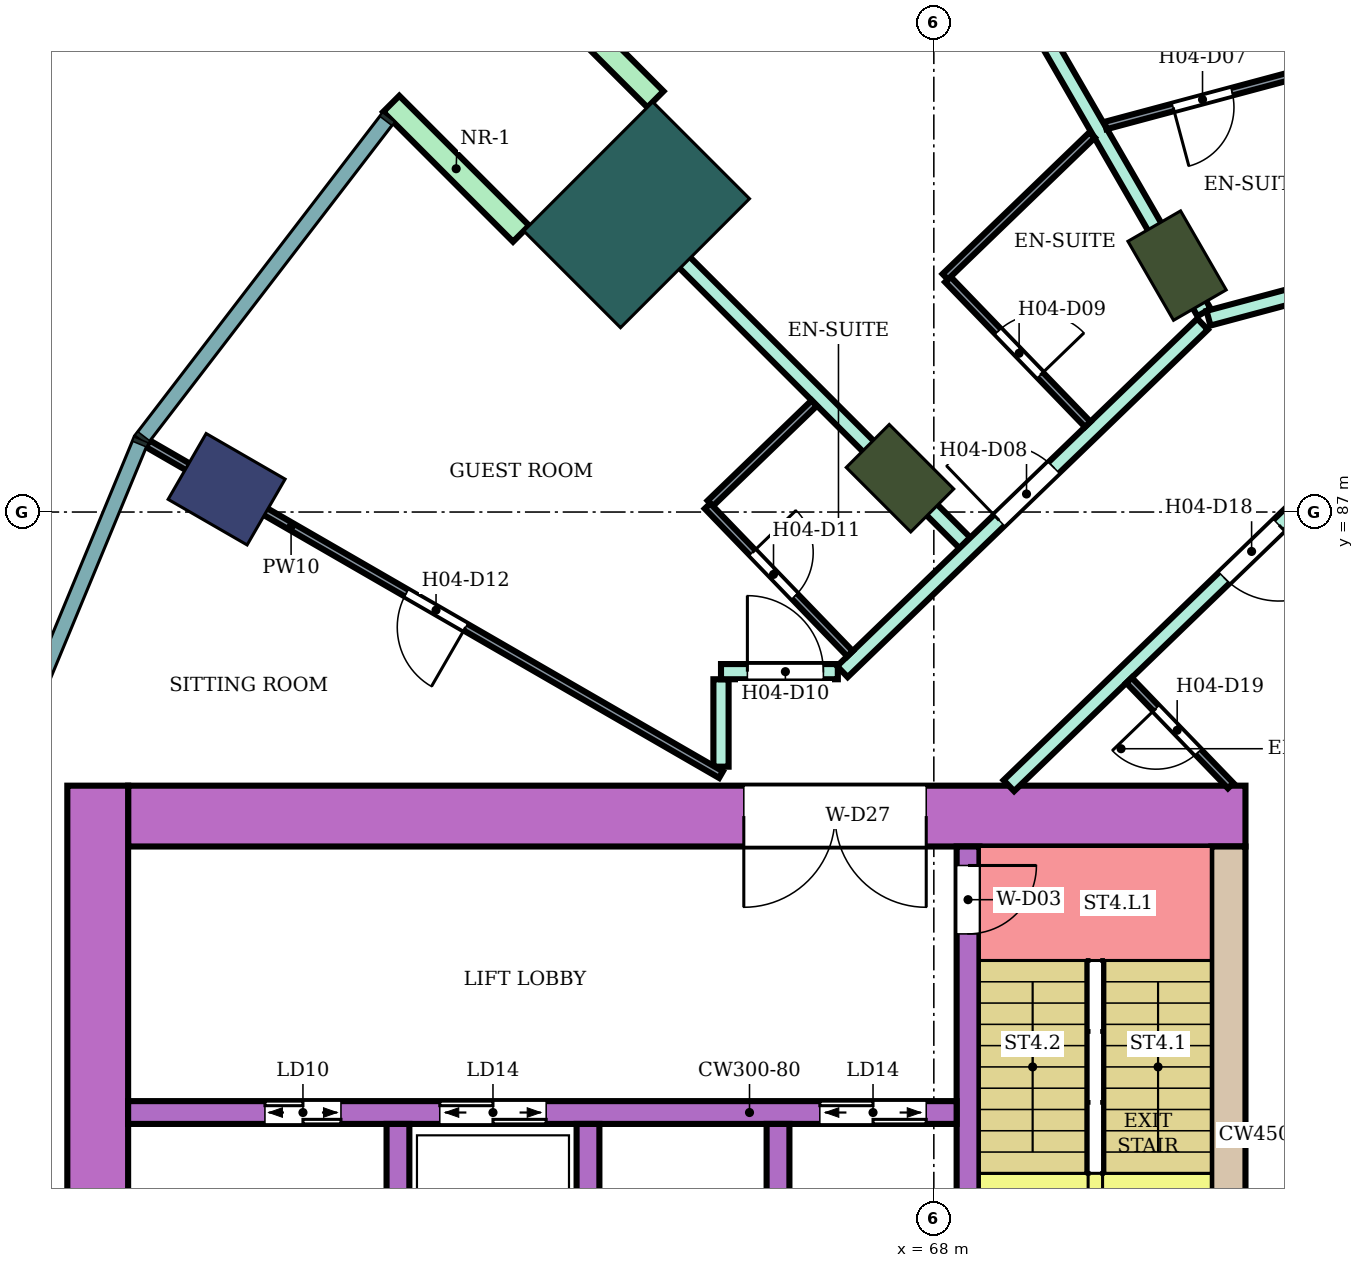
"""IFC4 building model, lengths in metres.
Left out: names, types, materials, properties, quantities, classifications, styles, units other than length and angle.
Written with IfcOpenShell. Run it as: python <this file> out.ifc"""

import sys

from ifc_helpers import new_model, si_unit, direction, frame, frame_2d, origin, origin_2d, place, context, subcontext, project, spatial, rectangle, extrude, element, fill, save


model = new_model("IFC4")
c1 = context("Model", 3, precision=1e-05, world=origin(), true_north=direction((0.0, 1.0)))
c2 = subcontext(c1, "Body", "Model", "MODEL_VIEW")
j1 = project(units=[si_unit("LENGTHUNIT", "METRE"), si_unit("PLANEANGLEUNIT", "RADIAN")], contexts=[c1])
p1 = place(None, origin())
s1 = spatial("IfcSite", under=j1, at=p1, CompositionType="ELEMENT")
p2 = place(p1, origin())
s2 = spatial("IfcBuilding", under=s1, at=p2, CompositionType="ELEMENT")
p3 = place(p2, frame((0.0, 0.0, 66.8)))
s3 = spatial("IfcBuildingStorey", under=s2, at=p3, CompositionType="ELEMENT", Elevation=66.8)
p4 = place(p3, frame((58.696, 87.3, 0.0), z_axis=(0.0, 0.0, 1.0), x_axis=(-0.866025403784, 0.5, 0.0)))
e1 = element("IfcColumn", 1, at=p4, inside=s3, PredefinedType="COLUMN", context=c2, shape_type="SweptSolid", body=[
    extrude(rectangle(XDim=1.2, YDim=1.0, at=origin_2d()), origin(), (0.0, 0.0, 1.0), 3.8),
])
for number, where, z_axis, x_axis in (
    (2, (71.2, 90.242, 0.0), (0.0, 0.0, 1.0), (-0.5, 0.866, 0.0)),
    (3, (67.555, 87.445, 0.0), (0.0, 0.0, 1.0), (-0.707, 0.707, 0.0)),
):
    element("IfcColumn", number, at=place(p3, frame(where, z_axis=z_axis, x_axis=x_axis)), inside=s3, PredefinedType="COLUMN", context=c2, shape_type="SweptSolid", body=[
        extrude(rectangle(XDim=1.2, YDim=0.8, at=origin_2d()), origin(), (0.0, 0.0, 1.0), 3.8),
    ])
p5 = place(p3, frame((64.09, 90.91, 0.0), z_axis=(0.0, 0.0, 1.0), x_axis=(-0.707106781187, 0.707106781187, 0.0)))
e4 = element("IfcColumn", 4, at=p5, inside=s3, PredefinedType="COLUMN", context=c2, shape_type="SweptSolid", body=[
    extrude(rectangle(XDim=1.8, YDim=2.4, at=origin_2d()), origin(), (0.0, 0.0, 1.0), 3.8),
])
p6 = place(p3, frame((72.1, 83.0, 0.0), z_axis=(0.0, 0.0, 1.0), x_axis=(-1.0, 0.0, 0.0)))
e5 = element("IfcWall", 5, at=p6, inside=s3, PredefinedType="SHEAR", context=c2, shape_type="SweptSolid", body=[
    extrude(rectangle(XDim=14.7, YDim=0.8, at=frame_2d((7.35, 0.0))), origin(), (0.0, 0.0, 1.0), 3.48),
])
p7 = place(p6, frame((4.2, 0.0, 0.0)))
e6 = element("IfcOpeningElement", 6, at=p7, cuts=e5, PredefinedType="OPENING", context=c2, shape_type="SweptSolid", body=[
    extrude(rectangle(XDim=2.4, YDim=2.4, at=frame_2d((1.2, 1.2))), frame((0.0, 0.41, 0.0), z_axis=(0.0, -1.0, 0.0), x_axis=(1.0, 0.0, 0.0)), (0.0, 0.0, 1.0), 0.82),
])
p8 = place(p3, frame((71.875, 82.6, 0.0), z_axis=(0.0, 0.0, 1.0), x_axis=(0.0, -1.0, 0.0)))
e7 = element("IfcWall", 7, at=p8, inside=s3, PredefinedType="SHEAR", context=c2, shape_type="SweptSolid", body=[
    extrude(rectangle(XDim=7.6, YDim=0.45, at=frame_2d((3.8, 0.0))), origin(), (0.0, 0.0, 1.0), 3.48),
])
p9 = place(p3, frame((57.0, 83.4, 0.0), z_axis=(0.0, 0.0, 1.0), x_axis=(0.0, -1.0, 0.0)))
e8 = element("IfcWall", 8, at=p9, inside=s3, PredefinedType="SHEAR", context=c2, shape_type="SweptSolid", body=[
    extrude(rectangle(XDim=16.8, YDim=0.8, at=frame_2d((8.4, 0.0))), origin(), (0.0, 0.0, 1.0), 3.48),
])
p10 = place(p3, frame((68.45, 82.6, 0.0), z_axis=(0.0, 0.0, 1.0), x_axis=(0.0, -1.0, 0.0)))
e9 = element("IfcWall", 9, at=p10, inside=s3, PredefinedType="SHEAR", context=c2, shape_type="SweptSolid", body=[
    extrude(rectangle(XDim=7.6, YDim=0.3, at=frame_2d((3.8, 0.0))), origin(), (0.0, 0.0, 1.0), 3.48),
])
p11 = place(p10, frame((0.25, 0.0, 0.0)))
e10 = element("IfcOpeningElement", 10, at=p11, cuts=e9, PredefinedType="OPENING", context=c2, shape_type="SweptSolid", body=[
    extrude(rectangle(XDim=0.9, YDim=2.1, at=frame_2d((0.45, 1.05))), frame((0.0, 0.16, 0.0), z_axis=(0.0, -1.0, 0.0), x_axis=(1.0, 0.0, 0.0)), (0.0, 0.0, 1.0), 0.32),
])
p12 = place(p3, frame((68.3, 79.1, 0.0), z_axis=(0.0, 0.0, 1.0), x_axis=(-1.0, 0.0, 0.0)))
e11 = element("IfcWall", 11, at=p12, inside=s3, PredefinedType="SHEAR", context=c2, shape_type="SweptSolid", body=[
    extrude(rectangle(XDim=10.9, YDim=0.3, at=frame_2d((5.45, 0.0))), origin(), (0.0, 0.0, 1.0), 3.48),
])
p13 = place(p12, frame((0.4, 0.0, 0.0)))
e12 = element("IfcOpeningElement", 12, at=p13, cuts=e11, PredefinedType="OPENING", context=c2, shape_type="SweptSolid", body=[
    extrude(rectangle(XDim=1.4, YDim=2.1, at=frame_2d((0.7, 1.05))), frame((0.0, 0.16, 0.0), z_axis=(0.0, -1.0, 0.0), x_axis=(1.0, 0.0, 0.0)), (0.0, 0.0, 1.0), 0.32),
])
p14 = place(p12, frame((5.4, 0.0, 0.0)))
e13 = element("IfcOpeningElement", 13, at=p14, cuts=e11, PredefinedType="OPENING", context=c2, shape_type="SweptSolid", body=[
    extrude(rectangle(XDim=1.4, YDim=2.1, at=frame_2d((0.7, 1.05))), frame((0.0, 0.16, 0.0), z_axis=(0.0, -1.0, 0.0), x_axis=(1.0, 0.0, 0.0)), (0.0, 0.0, 1.0), 0.32),
])
p15 = place(p12, frame((8.1, 0.0, 0.0)))
e14 = element("IfcOpeningElement", 14, at=p15, cuts=e11, PredefinedType="OPENING", context=c2, shape_type="SweptSolid", body=[
    extrude(rectangle(XDim=1.0, YDim=2.1, at=frame_2d((0.5, 1.05))), frame((0.0, 0.16, 0.0), z_axis=(0.0, -1.0, 0.0), x_axis=(1.0, 0.0, 0.0)), (0.0, 0.0, 1.0), 0.32),
])
for number, where, z_axis, x_axis in (
    (15, (65.95, 78.95, 0.0), (0.0, 0.0, 1.0), (0.0, -1.0, 0.0)),
    (16, (63.45, 78.95, 0.0), (0.0, 0.0, 1.0), (0.0, -1.0, 0.0)),
    (17, (60.95, 78.95, 0.0), (0.0, 0.0, 1.0), (0.0, -1.0, 0.0)),
):
    element("IfcWall", number, at=place(p3, frame(where, z_axis=z_axis, x_axis=x_axis)), inside=s3, PredefinedType="SHEAR", context=c2, shape_type="SweptSolid", body=[
        extrude(rectangle(XDim=2.55, YDim=0.3, at=frame_2d((1.275, 0.0))), origin(), (0.0, 0.0, 1.0), 3.48),
    ])
for number, where, z_axis, x_axis in (
    (18, (64.338, 92.43, 0.0), (0.0, 0.0, 1.0), (-0.707, 0.707, 0.0)),
    (19, (62.57, 90.662, 0.0), (0.0, 0.0, 1.0), (-0.707, 0.707, 0.0)),
):
    element("IfcWall", number, at=place(p3, frame(where, z_axis=z_axis, x_axis=x_axis)), inside=s3, PredefinedType="NOTDEFINED", context=c2, shape_type="SweptSolid", body=[
        extrude(rectangle(XDim=2.416, YDim=0.3, at=frame_2d((1.208, 0.0))), origin(), (0.0, 0.0, 1.0), 3.8),
    ])
p16 = place(p3, frame((73.415, 78.802, 0.0), z_axis=(0.0, 0.0, 1.0), x_axis=(-0.258789828301, -0.965933654434, 0.0)))
e20 = element("IfcWall", 20, at=p16, inside=s3, PredefinedType="NOTDEFINED", context=c2, shape_type="SweptSolid", body=[
    extrude(rectangle(XDim=3.936, YDim=0.2, at=frame_2d((1.968, 0.0))), origin(), (0.0, 0.0, 1.0), 3.8),
])
p17 = place(p16, frame((0.468, 0.0, 0.9)))
e21 = element("IfcOpeningElement", 21, at=p17, cuts=e20, PredefinedType="OPENING", context=c2, shape_type="SweptSolid", body=[
    extrude(rectangle(XDim=3.0, YDim=2.3, at=frame_2d((1.5, 1.15))), frame((0.0, 0.11, 0.0), z_axis=(0.0, -1.0, 0.0), x_axis=(1.0, 0.0, 0.0)), (0.0, 0.0, 1.0), 0.22),
])
p18 = place(p3, frame((63.598, 91.407, 0.0), z_axis=(0.0, 0.0, 1.0), x_axis=(0.706981202484, -0.707232337591, 0.0)))
e22 = element("IfcWall", 22, at=p18, inside=s3, PredefinedType="PARTITIONING", context=c2, shape_type="SweptSolid", body=[
    extrude(rectangle(XDim=6.805, YDim=0.2, at=frame_2d((3.402, 0.0))), origin(), (0.0, 0.0, 1.0), 3.35),
])
p19 = place(p3, frame((65.2, 83.65, 0.0), z_axis=(0.0, 0.0, 1.0), x_axis=(0.0, 1.0, 0.0)))
e23 = element("IfcWall", 23, at=p19, inside=s3, PredefinedType="PARTITIONING", context=c2, shape_type="SweptSolid", body=[
    extrude(rectangle(XDim=1.15, YDim=0.2, at=frame_2d((0.575, 0.0))), origin(), (0.0, 0.0, 1.0), 3.35),
])
p20 = place(p3, frame((65.2, 84.9, 0.0), z_axis=(0.0, 0.0, 1.0), x_axis=(1.0, 0.0, 0.0)))
e24 = element("IfcWall", 24, at=p20, inside=s3, PredefinedType="PARTITIONING", context=c2, shape_type="SweptSolid", body=[
    extrude(rectangle(XDim=1.537, YDim=0.2, at=frame_2d((0.769, 0.0))), origin(), (0.0, 0.0, 1.0), 3.35),
])
p21 = place(p20, frame((0.347, 0.0, 0.0)))
e25 = element("IfcOpeningElement", 25, at=p21, cuts=e24, PredefinedType="OPENING", context=c2, shape_type="SweptSolid", body=[
    extrude(rectangle(XDim=1.0, YDim=2.1, at=frame_2d((0.5, 1.05))), frame((0.0, 0.11, 0.0), z_axis=(0.0, -1.0, 0.0), x_axis=(1.0, 0.0, 0.0)), (0.0, 0.0, 1.0), 0.22),
])
p22 = place(p3, frame((66.797, 84.9, 0.0), z_axis=(0.0, 0.0, 1.0), x_axis=(0.719692092412, 0.694293376116, 0.0)))
e26 = element("IfcWall", 26, at=p22, inside=s3, PredefinedType="PARTITIONING", context=c2, shape_type="SweptSolid", body=[
    extrude(rectangle(XDim=6.584, YDim=0.2, at=frame_2d((3.292, 0.0))), origin(), (0.0, 0.0, 1.0), 3.35),
])
p23 = place(p22, frame((2.866, 0.0, 0.0)))
e27 = element("IfcOpeningElement", 27, at=p23, cuts=e26, PredefinedType="OPENING", context=c2, shape_type="SweptSolid", body=[
    extrude(rectangle(XDim=1.0, YDim=2.1, at=frame_2d((0.5, 1.05))), frame((0.0, 0.11, 0.0), z_axis=(0.0, -1.0, 0.0), x_axis=(1.0, 0.0, 0.0)), (0.0, 0.0, 1.0), 0.22),
])
p24 = place(p3, frame((67.101, 97.342, 0.0), z_axis=(0.0, 0.0, 1.0), x_axis=(0.499932813297, -0.866064190571, 0.0)))
e28 = element("IfcWall", 28, at=p24, inside=s3, PredefinedType="PARTITIONING", context=c2, shape_type="SweptSolid", body=[
    extrude(rectangle(XDim=8.908, YDim=0.2, at=frame_2d((4.454, 0.0))), origin(), (0.0, 0.0, 1.0), 3.35),
])
p25 = place(p3, frame((68.987, 83.4, 0.0), z_axis=(0.0, 0.0, 1.0), x_axis=(0.719591503389, 0.694397629784, 0.0)))
e29 = element("IfcWall", 29, at=p25, inside=s3, PredefinedType="PARTITIONING", context=c2, shape_type="SweptSolid", body=[
    extrude(rectangle(XDim=5.378, YDim=0.2, at=frame_2d((2.689, 0.0))), origin(), (0.0, 0.0, 1.0), 3.35),
])
p26 = place(p25, frame((3.938, 0.0, 0.0)))
e30 = element("IfcOpeningElement", 30, at=p26, cuts=e29, PredefinedType="OPENING", context=c2, shape_type="SweptSolid", body=[
    extrude(rectangle(XDim=1.0, YDim=2.1, at=frame_2d((0.5, 1.05))), frame((0.0, 0.11, 0.0), z_axis=(0.0, -1.0, 0.0), x_axis=(1.0, 0.0, 0.0)), (0.0, 0.0, 1.0), 0.22),
])
p27 = place(p3, frame((71.614, 89.55, 0.0), z_axis=(0.0, 0.0, 1.0), x_axis=(0.965982156828, 0.258608725086, 0.0)))
e31 = element("IfcWall", 31, at=p27, inside=s3, PredefinedType="PARTITIONING", context=c2, shape_type="SweptSolid", body=[
    extrude(rectangle(XDim=8.592, YDim=0.2, at=frame_2d((4.296, 0.0))), origin(), (0.0, 0.0, 1.0), 3.35),
])
p28 = place(p27, frame((4.865, 0.0, 0.0)))
e32 = element("IfcOpeningElement", 32, at=p28, cuts=e31, PredefinedType="OPENING", context=c2, shape_type="SweptSolid", body=[
    extrude(rectangle(XDim=1.0, YDim=2.1, at=frame_2d((0.5, 1.05))), frame((0.0, 0.11, 0.0), z_axis=(0.0, -1.0, 0.0), x_axis=(1.0, 0.0, 0.0)), (0.0, 0.0, 1.0), 0.22),
])
p29 = place(p27, frame((2.804, 0.0, 0.0)))
e33 = element("IfcOpeningElement", 33, at=p29, cuts=e31, PredefinedType="OPENING", context=c2, shape_type="SweptSolid", body=[
    extrude(rectangle(XDim=1.0, YDim=2.1, at=frame_2d((0.5, 1.05))), frame((0.0, 0.11, 0.0), z_axis=(0.0, -1.0, 0.0), x_axis=(1.0, 0.0, 0.0)), (0.0, 0.0, 1.0), 0.22),
])
p30 = place(p3, frame((57.659, 87.899, 0.0), z_axis=(0.0, 0.0, 1.0), x_axis=(0.86602264145, -0.500004784474, 0.0)))
e34 = element("IfcWall", 34, at=p30, inside=s3, PredefinedType="PARTITIONING", context=c2, shape_type="SweptSolid", body=[
    extrude(rectangle(XDim=8.708, YDim=0.1, at=frame_2d((4.354, 0.0))), origin(), (0.0, 0.0, 1.0), 3.35),
])
p31 = place(p30, frame((3.929, 0.0, 0.0)))
e35 = element("IfcOpeningElement", 35, at=p31, cuts=e34, PredefinedType="OPENING", context=c2, shape_type="SweptSolid", body=[
    extrude(rectangle(XDim=0.9, YDim=2.1, at=frame_2d((0.45, 1.05))), frame((0.0, 0.06, 0.0), z_axis=(0.0, -1.0, 0.0), x_axis=(1.0, 0.0, 0.0)), (0.0, 0.0, 1.0), 0.12),
])
p32 = place(p3, frame((65.059, 87.114, 0.0), z_axis=(0.0, 0.0, 1.0), x_axis=(0.719715847356, 0.694268751324, 0.0)))
e36 = element("IfcWall", 36, at=p32, inside=s3, PredefinedType="PARTITIONING", context=c2, shape_type="SweptSolid", body=[
    extrude(rectangle(XDim=1.9, YDim=0.1, at=frame_2d((0.95, 0.0))), origin(), (0.0, 0.0, 1.0), 3.35),
])
p33 = place(p3, frame((65.023, 87.079, 0.0), z_axis=(0.0, 0.0, 1.0), x_axis=(0.694287838235, -0.719697434815, 0.0)))
e37 = element("IfcWall", 37, at=p33, inside=s3, PredefinedType="PARTITIONING", context=c2, shape_type="SweptSolid", body=[
    extrude(rectangle(XDim=2.7, YDim=0.1, at=frame_2d((1.35, 0.0))), origin(), (0.0, 0.0, 1.0), 3.35),
])
p34 = place(p33, frame((0.85, 0.0, 0.0)))
e38 = element("IfcOpeningElement", 38, at=p34, cuts=e37, PredefinedType="OPENING", context=c2, shape_type="SweptSolid", body=[
    extrude(rectangle(XDim=0.8, YDim=2.1, at=frame_2d((0.4, 1.05))), frame((0.0, 0.06, 0.0), z_axis=(0.0, -1.0, 0.0), x_axis=(1.0, 0.0, 0.0)), (0.0, 0.0, 1.0), 0.12),
])
p35 = place(p3, frame((68.185, 90.06, 0.0), z_axis=(0.0, 0.0, 1.0), x_axis=(0.69446127412, -0.719530081892, 0.0)))
e39 = element("IfcWall", 39, at=p35, inside=s3, PredefinedType="PARTITIONING", context=c2, shape_type="SweptSolid", body=[
    extrude(rectangle(XDim=2.649, YDim=0.1, at=frame_2d((1.324, 0.0))), origin(), (0.0, 0.0, 1.0), 3.35),
])
p36 = place(p35, frame((0.95, 0.0, 0.0)))
e40 = element("IfcOpeningElement", 40, at=p36, cuts=e39, PredefinedType="OPENING", context=c2, shape_type="SweptSolid", body=[
    extrude(rectangle(XDim=0.8, YDim=2.1, at=frame_2d((0.4, 1.05))), frame((0.0, 0.06, 0.0), z_axis=(0.0, -1.0, 0.0), x_axis=(1.0, 0.0, 0.0)), (0.0, 0.0, 1.0), 0.12),
])
p37 = place(p3, frame((68.15, 90.096, 0.0), z_axis=(0.0, 0.0, 1.0), x_axis=(0.719669144226, 0.694317163009, 0.0)))
e41 = element("IfcWall", 41, at=p37, inside=s3, PredefinedType="PARTITIONING", context=c2, shape_type="SweptSolid", body=[
    extrude(rectangle(XDim=2.687, YDim=0.1, at=frame_2d((1.343, 0.0))), origin(), (0.0, 0.0, 1.0), 3.35),
])
p38 = place(p3, frame((70.258, 92.085, 0.0), z_axis=(0.0, 0.0, 1.0), x_axis=(0.965948051503, 0.258736085224, 0.0)))
e42 = element("IfcWall", 42, at=p38, inside=s3, PredefinedType="PARTITIONING", context=c2, shape_type="SweptSolid", body=[
    extrude(rectangle(XDim=2.703, YDim=0.1, at=frame_2d((1.352, 0.0))), origin(), (0.0, 0.0, 1.0), 3.35),
])
p39 = place(p38, frame((0.922, 0.0, 0.0)))
e43 = element("IfcOpeningElement", 43, at=p39, cuts=e42, PredefinedType="OPENING", context=c2, shape_type="SweptSolid", body=[
    extrude(rectangle(XDim=0.8, YDim=2.1, at=frame_2d((0.4, 1.05))), frame((0.0, 0.06, 0.0), z_axis=(0.0, -1.0, 0.0), x_axis=(1.0, 0.0, 0.0)), (0.0, 0.0, 1.0), 0.12),
])
p40 = place(p3, frame((70.567, 84.786, 0.0), z_axis=(0.0, 0.0, 1.0), x_axis=(0.694447472534, -0.719543402368, 0.0)))
e44 = element("IfcWall", 44, at=p40, inside=s3, PredefinedType="PARTITIONING", context=c2, shape_type="SweptSolid", body=[
    extrude(rectangle(XDim=1.926, YDim=0.1, at=frame_2d((0.963, 0.0))), origin(), (0.0, 0.0, 1.0), 3.35),
])
p41 = place(p40, frame((0.513, 0.0, 0.0)))
e45 = element("IfcOpeningElement", 45, at=p41, cuts=e44, PredefinedType="OPENING", context=c2, shape_type="SweptSolid", body=[
    extrude(rectangle(XDim=0.8, YDim=2.1, at=frame_2d((0.4, 1.05))), frame((0.0, 0.06, 0.0), z_axis=(0.0, -1.0, 0.0), x_axis=(1.0, 0.0, 0.0)), (0.0, 0.0, 1.0), 0.12),
])
p42 = place(p17, origin())
e46 = element("IfcWindow", 46, at=p42, inside=s3, PartitioningType="SINGLE_PANEL", PredefinedType="WINDOW", context=c2, shape_type="SweptSolid", body=[
    extrude(rectangle(XDim=3.0, YDim=2.3, at=frame_2d((1.5, 1.15))), frame((0.0, 0.03, 0.0), z_axis=(0.0, -1.0, 0.0), x_axis=(1.0, 0.0, 0.0)), (0.0, 0.0, 1.0), 0.06),
])
fill(e21, e46)
p43 = place(p39, frame((0.8, 0.0, 0.0), z_axis=(0.0, 0.0, 1.0), x_axis=(-1.0, 0.0, 0.0)))
e47 = element("IfcDoor", 47, at=p43, inside=s3, OperationType="SINGLE_SWING_RIGHT", PredefinedType="DOOR", context=c2, shape_type="SweptSolid", body=[
    extrude(rectangle(XDim=0.8, YDim=2.1, at=frame_2d((0.4, 1.05))), frame((0.0, 0.025, 0.0), z_axis=(0.0, -1.0, 0.0), x_axis=(1.0, 0.0, 0.0)), (0.0, 0.0, 1.0), 0.05),
])
fill(e43, e47)
p44 = place(p23, origin())
e48 = element("IfcDoor", 48, at=p44, inside=s3, OperationType="SINGLE_SWING_LEFT", PredefinedType="DOOR", context=c2, shape_type="SweptSolid", body=[
    extrude(rectangle(XDim=1.0, YDim=2.1, at=frame_2d((0.5, 1.05))), frame((0.0, 0.025, 0.0), z_axis=(0.0, -1.0, 0.0), x_axis=(1.0, 0.0, 0.0)), (0.0, 0.0, 1.0), 0.05),
])
fill(e27, e48)
p45 = place(p36, origin())
e49 = element("IfcDoor", 49, at=p45, inside=s3, OperationType="SINGLE_SWING_RIGHT", PredefinedType="DOOR", context=c2, shape_type="SweptSolid", body=[
    extrude(rectangle(XDim=0.8, YDim=2.1, at=frame_2d((0.4, 1.05))), frame((0.0, 0.025, 0.0), z_axis=(0.0, -1.0, 0.0), x_axis=(1.0, 0.0, 0.0)), (0.0, 0.0, 1.0), 0.05),
])
fill(e40, e49)
p46 = place(p21, origin())
e50 = element("IfcDoor", 50, at=p46, inside=s3, OperationType="SINGLE_SWING_LEFT", PredefinedType="DOOR", context=c2, shape_type="SweptSolid", body=[
    extrude(rectangle(XDim=1.0, YDim=2.1, at=frame_2d((0.5, 1.05))), frame((0.0, 0.025, 0.0), z_axis=(0.0, -1.0, 0.0), x_axis=(1.0, 0.0, 0.0)), (0.0, 0.0, 1.0), 0.05),
])
fill(e25, e50)
p47 = place(p34, origin())
e51 = element("IfcDoor", 51, at=p47, inside=s3, OperationType="SINGLE_SWING_LEFT", PredefinedType="DOOR", context=c2, shape_type="SweptSolid", body=[
    extrude(rectangle(XDim=0.8, YDim=2.1, at=frame_2d((0.4, 1.05))), frame((0.0, 0.025, 0.0), z_axis=(0.0, -1.0, 0.0), x_axis=(1.0, 0.0, 0.0)), (0.0, 0.0, 1.0), 0.05),
])
fill(e38, e51)
p48 = place(p31, frame((0.9, 0.0, 0.0), z_axis=(0.0, 0.0, 1.0), x_axis=(-1.0, 0.0, 0.0)))
e52 = element("IfcDoor", 52, at=p48, inside=s3, OperationType="SINGLE_SWING_LEFT", PredefinedType="DOOR", context=c2, shape_type="SweptSolid", body=[
    extrude(rectangle(XDim=0.9, YDim=2.1, at=frame_2d((0.45, 1.05))), frame((0.0, 0.025, 0.0), z_axis=(0.0, -1.0, 0.0), x_axis=(1.0, 0.0, 0.0)), (0.0, 0.0, 1.0), 0.05),
])
fill(e35, e52)
p49 = place(p26, frame((1.0, 0.0, 0.0), z_axis=(0.0, 0.0, 1.0), x_axis=(-1.0, 0.0, 0.0)))
e53 = element("IfcDoor", 53, at=p49, inside=s3, OperationType="SINGLE_SWING_LEFT", PredefinedType="DOOR", context=c2, shape_type="SweptSolid", body=[
    extrude(rectangle(XDim=1.0, YDim=2.1, at=frame_2d((0.5, 1.05))), frame((0.0, 0.025, 0.0), z_axis=(0.0, -1.0, 0.0), x_axis=(1.0, 0.0, 0.0)), (0.0, 0.0, 1.0), 0.05),
])
fill(e30, e53)
p50 = place(p41, frame((0.8, 0.0, 0.0), z_axis=(0.0, 0.0, 1.0), x_axis=(-1.0, 0.0, 0.0)))
e54 = element("IfcDoor", 54, at=p50, inside=s3, OperationType="SINGLE_SWING_RIGHT", PredefinedType="DOOR", context=c2, shape_type="SweptSolid", body=[
    extrude(rectangle(XDim=0.8, YDim=2.1, at=frame_2d((0.4, 1.05))), frame((0.0, 0.025, 0.0), z_axis=(0.0, -1.0, 0.0), x_axis=(1.0, 0.0, 0.0)), (0.0, 0.0, 1.0), 0.05),
])
fill(e45, e54)
p51 = place(p11, origin())
e55 = element("IfcDoor", 55, at=p51, inside=s3, OperationType="SINGLE_SWING_LEFT", PredefinedType="DOOR", context=c2, shape_type="SweptSolid", body=[
    extrude(rectangle(XDim=0.9, YDim=2.1, at=frame_2d((0.45, 1.05))), frame((0.0, 0.025, 0.0), z_axis=(0.0, -1.0, 0.0), x_axis=(1.0, 0.0, 0.0)), (0.0, 0.0, 1.0), 0.05),
])
fill(e10, e55)
p52 = place(p13, origin())
e56 = element("IfcDoor", 56, at=p52, inside=s3, OperationType="DOUBLE_DOOR_SLIDING", PredefinedType="DOOR", context=c2, shape_type="SweptSolid", body=[
    extrude(rectangle(XDim=1.4, YDim=2.1, at=frame_2d((0.7, 1.05))), frame((0.0, 0.025, 0.0), z_axis=(0.0, -1.0, 0.0), x_axis=(1.0, 0.0, 0.0)), (0.0, 0.0, 1.0), 0.05),
])
fill(e12, e56)
p53 = place(p14, origin())
e57 = element("IfcDoor", 57, at=p53, inside=s3, OperationType="DOUBLE_DOOR_SLIDING", PredefinedType="DOOR", context=c2, shape_type="SweptSolid", body=[
    extrude(rectangle(XDim=1.4, YDim=2.1, at=frame_2d((0.7, 1.05))), frame((0.0, 0.025, 0.0), z_axis=(0.0, -1.0, 0.0), x_axis=(1.0, 0.0, 0.0)), (0.0, 0.0, 1.0), 0.05),
])
fill(e13, e57)
p54 = place(p15, origin())
e58 = element("IfcDoor", 58, at=p54, inside=s3, OperationType="DOUBLE_DOOR_SLIDING", PredefinedType="DOOR", context=c2, shape_type="SweptSolid", body=[
    extrude(rectangle(XDim=1.0, YDim=2.1, at=frame_2d((0.5, 1.05))), frame((0.0, 0.025, 0.0), z_axis=(0.0, -1.0, 0.0), x_axis=(1.0, 0.0, 0.0)), (0.0, 0.0, 1.0), 0.05),
])
fill(e14, e58)
p55 = place(p7, origin())
e59 = element("IfcDoor", 59, at=p55, inside=s3, OperationType="DOUBLE_DOOR_SINGLE_SWING", PredefinedType="DOOR", context=c2, shape_type="SweptSolid", body=[
    extrude(rectangle(XDim=2.4, YDim=2.4, at=frame_2d((1.2, 1.2))), frame((0.0, 0.025, 0.0), z_axis=(0.0, -1.0, 0.0), x_axis=(1.0, 0.0, 0.0)), (0.0, 0.0, 1.0), 0.05),
])
fill(e6, e59)
save(model, sys.argv[1])
